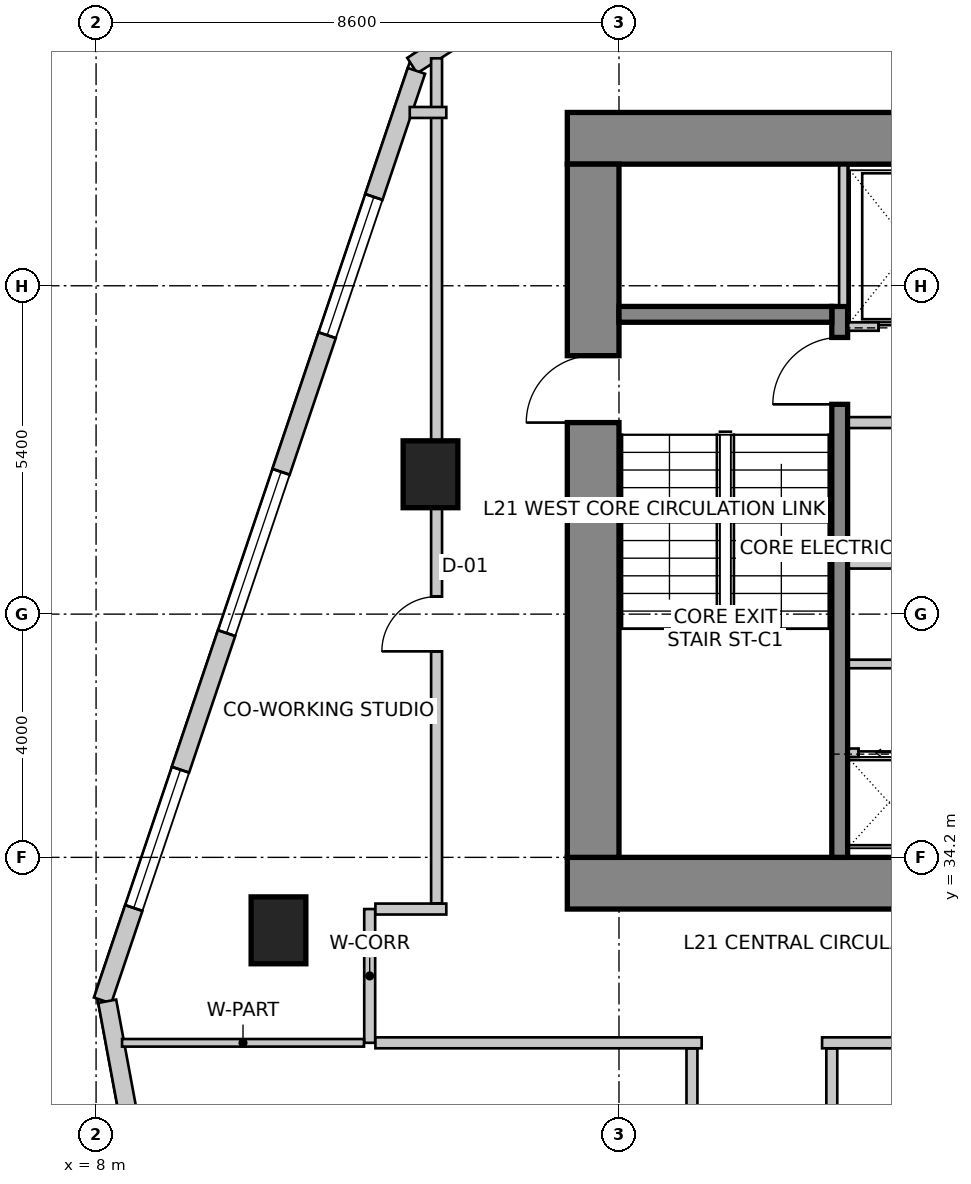
"""IFC4 building model, lengths in metres.
Left out: names, types, materials, properties, quantities, classifications, styles, units other than length and angle.
Written with IfcOpenShell. Run it as: python <this file> out.ifc"""

import sys

from ifc_helpers import new_model, si_unit, direction, frame, frame_2d, origin, origin_2d, place, context, subcontext, project, spatial, rectangle, extrude, source, transform, mapped, element, fill, save


model = new_model("IFC4")
c1 = context("Model", 3, precision=1e-05, world=origin(), true_north=direction((0.0, 1.0)))
c2 = subcontext(c1, "Body", "Model", "MODEL_VIEW")
j1 = project(units=[si_unit("LENGTHUNIT", "METRE"), si_unit("PLANEANGLEUNIT", "RADIAN")], contexts=[c1])
p1 = place(None, origin())
s1 = spatial("IfcSite", under=j1, at=p1, CompositionType="ELEMENT")
p2 = place(p1, origin())
s2 = spatial("IfcBuilding", under=s1, at=p2, CompositionType="ELEMENT")
p3 = place(p2, frame((0.0, 0.0, 87.0)))
s3 = spatial("IfcBuildingStorey", under=s2, at=p3, CompositionType="ELEMENT", Elevation=87.0)
p4 = place(p3, frame((15.75, 46.025, 0.0), z_axis=(0.0, 0.0, 1.0), x_axis=(1.0, 0.0, 0.0)))
e1 = element("IfcWall", 1, at=p4, inside=s3, PredefinedType="SHEAR", context=c2, shape_type="SweptSolid", body=[
    extrude(rectangle(XDim=16.1, YDim=0.85, at=frame_2d((8.05, 0.0))), origin(), (0.0, 0.0, 1.0), 4.0),
])
p5 = place(p3, frame((15.75, 33.775, 0.0), z_axis=(0.0, 0.0, 1.0), x_axis=(1.0, 0.0, 0.0)))
e2 = element("IfcWall", 2, at=p5, inside=s3, PredefinedType="SHEAR", context=c2, shape_type="SweptSolid", body=[
    extrude(rectangle(XDim=16.1, YDim=0.85, at=frame_2d((8.05, 0.0))), origin(), (0.0, 0.0, 1.0), 4.0),
])
m1 = source(origin(), c2, "Body", "SweptSolid", [
    extrude(rectangle(XDim=1.3, YDim=2.15, at=frame_2d((0.65, 1.075))), frame((0.0, 0.435, 0.0), z_axis=(0.0, -1.0, 0.0), x_axis=(1.0, 0.0, 0.0)), (0.0, 0.0, 1.0), 0.87),
])
p6 = place(p5, frame((10.18, 0.0, 0.0)))
e3 = element("IfcOpeningElement", 3, at=p6, cuts=e2, PredefinedType="OPENING", context=c2, shape_type="MappedRepresentation", body=[
    mapped(m1, transform((0.0, 0.0, 0.0), scale=1.0)),
])
p7 = place(p3, frame((16.175, 34.2, 0.0), z_axis=(0.0, 0.0, 1.0), x_axis=(0.0, 1.0, 0.0)))
e4 = element("IfcWall", 4, at=p7, inside=s3, PredefinedType="SHEAR", context=c2, shape_type="SweptSolid", body=[
    extrude(rectangle(XDim=11.4, YDim=0.85, at=frame_2d((5.7, 0.0))), origin(), (0.0, 0.0, 1.0), 4.0),
])
m2 = source(origin(), c2, "Body", "SweptSolid", [
    extrude(rectangle(XDim=1.1, YDim=2.15, at=frame_2d((0.55, 1.075))), frame((0.0, 0.435, 0.0), z_axis=(0.0, -1.0, 0.0), x_axis=(1.0, 0.0, 0.0)), (0.0, 0.0, 1.0), 0.87),
])
p8 = place(p7, frame((7.15, 0.0, 0.0)))
e5 = element("IfcOpeningElement", 5, at=p8, cuts=e4, PredefinedType="OPENING", context=c2, shape_type="MappedRepresentation", body=[
    mapped(m2, transform((0.0, 0.0, 0.0), scale=1.0)),
])
p9 = place(p3, frame((20.23, 34.2, 0.0), z_axis=(0.0, 0.0, 1.0), x_axis=(0.0, 1.0, 0.0)))
e6 = element("IfcWall", 6, at=p9, inside=s3, PredefinedType="SHEAR", context=c2, shape_type="SweptSolid", body=[
    extrude(rectangle(XDim=9.06, YDim=0.26, at=frame_2d((4.53, 0.0))), origin(), (0.0, 0.0, 1.0), 4.0),
])
m3 = source(origin(), c2, "Body", "SweptSolid", [
    extrude(rectangle(XDim=1.1, YDim=2.15, at=frame_2d((0.55, 1.075))), frame((0.0, 0.14, 0.0), z_axis=(0.0, -1.0, 0.0), x_axis=(1.0, 0.0, 0.0)), (0.0, 0.0, 1.0), 0.28),
])
p10 = place(p9, frame((7.45, 0.0, 0.0)))
e7 = element("IfcOpeningElement", 7, at=p10, cuts=e6, PredefinedType="OPENING", context=c2, shape_type="MappedRepresentation", body=[
    mapped(m3, transform((0.0, 0.0, 0.0), scale=1.0)),
])
p11 = place(p3, frame((16.6, 43.13, 0.0), z_axis=(0.0, 0.0, 1.0), x_axis=(1.0, 0.0, 0.0)))
e8 = element("IfcWall", 8, at=p11, inside=s3, PredefinedType="SHEAR", context=c2, shape_type="SweptSolid", body=[
    extrude(rectangle(XDim=3.5, YDim=0.26, at=frame_2d((1.75, 0.0))), origin(), (0.0, 0.0, 1.0), 4.0),
])
m4 = source(origin(), c2, "Body", "SweptSolid", [
    extrude(rectangle(XDim=0.9, YDim=1.1, at=origin_2d()), origin(), (0.0, 0.0, 1.0), 4.0),
])
for number, where, z_axis, x_axis in (
    (9, (11.0, 33.0, 0.0), (0.0, 0.0, 1.0), (1.0, 0.0, 0.0)),
    (10, (13.5, 40.5, 0.0), (0.0, 0.0, 1.0), (1.0, 0.0, 0.0)),
):
    element("IfcColumn", number, at=place(p3, frame(where, z_axis=z_axis, x_axis=x_axis)), inside=s3, PredefinedType="COLUMN", context=c2, shape_type="MappedRepresentation", body=[
        mapped(m4, transform((0.0, 0.0, 0.0), scale=1.0)),
    ])
p12 = place(p3, frame((21.875, 52.742, 0.0), z_axis=(0.0, 0.0, 1.0), x_axis=(-0.843662465249, -0.536873956092, 0.0)))
e11 = element("IfcWall", 11, at=p12, inside=s3, PredefinedType="SOLIDWALL", context=c2, shape_type="SweptSolid", body=[
    extrude(rectangle(XDim=10.284, YDim=0.3, at=frame_2d((5.142, 0.0))), origin(), (0.0, 0.0, 1.0), 3.75),
])
m5 = source(origin(), c2, "Body", "SweptSolid", [
    extrude(rectangle(XDim=1.2, YDim=1.6, at=frame_2d((0.6, 0.8))), frame((0.0, 0.16, 0.0), z_axis=(0.0, -1.0, 0.0), x_axis=(1.0, 0.0, 0.0)), (0.0, 0.0, 1.0), 0.32),
])
p13 = place(p12, frame((0.479, 0.0, 0.85)))
e12 = element("IfcOpeningElement", 12, at=p13, cuts=e11, PredefinedType="OPENING", context=c2, shape_type="MappedRepresentation", body=[
    mapped(m5, transform((0.0, 0.0, 0.0), scale=1.0)),
])
m6 = source(origin(), c2, "Body", "SweptSolid", [
    extrude(rectangle(XDim=2.8, YDim=2.4, at=frame_2d((1.4, 1.2))), frame((0.0, 0.16, 0.0), z_axis=(0.0, -1.0, 0.0), x_axis=(1.0, 0.0, 0.0)), (0.0, 0.0, 1.0), 0.32),
])
p14 = place(p12, frame((3.342, 0.0, 0.85)))
e13 = element("IfcOpeningElement", 13, at=p14, cuts=e11, PredefinedType="OPENING", context=c2, shape_type="MappedRepresentation", body=[
    mapped(m6, transform((0.0, 0.0, 0.0), scale=1.0)),
])
m7 = source(origin(), c2, "Body", "SweptSolid", [
    extrude(rectangle(XDim=1.8, YDim=2.1, at=frame_2d((0.9, 1.05))), frame((0.0, 0.16, 0.0), z_axis=(0.0, -1.0, 0.0), x_axis=(1.0, 0.0, 0.0)), (0.0, 0.0, 1.0), 0.32),
])
p15 = place(p12, frame((7.753, 0.0, 0.85)))
e14 = element("IfcOpeningElement", 14, at=p15, cuts=e11, PredefinedType="OPENING", context=c2, shape_type="MappedRepresentation", body=[
    mapped(m7, transform((0.0, 0.0, 0.0), scale=1.0)),
])
p16 = place(p3, frame((13.269, 47.134, 0.0), z_axis=(0.0, 0.0, 1.0), x_axis=(-0.319920423265, -0.947444416722, 0.0)))
e15 = element("IfcWall", 15, at=p16, inside=s3, PredefinedType="SOLIDWALL", context=c2, shape_type="SweptSolid", body=[
    extrude(rectangle(XDim=16.135, YDim=0.3, at=frame_2d((8.067, 0.0))), origin(), (0.0, 0.0, 1.0), 3.75),
])
m8 = source(origin(), c2, "Body", "SweptSolid", [
    extrude(rectangle(XDim=2.4, YDim=2.2, at=frame_2d((1.2, 1.1))), frame((0.0, 0.16, 0.0), z_axis=(0.0, -1.0, 0.0), x_axis=(1.0, 0.0, 0.0)), (0.0, 0.0, 1.0), 0.32),
])
p17 = place(p16, frame((2.188, 0.0, 0.85)))
e16 = element("IfcOpeningElement", 16, at=p17, cuts=e15, PredefinedType="OPENING", context=c2, shape_type="MappedRepresentation", body=[
    mapped(m8, transform((0.0, 0.0, 0.0), scale=1.0)),
])
p18 = place(p16, frame((6.959, 0.0, 0.85)))
e17 = element("IfcOpeningElement", 17, at=p18, cuts=e15, PredefinedType="OPENING", context=c2, shape_type="MappedRepresentation", body=[
    mapped(m6, transform((0.0, 0.0, 0.0), scale=1.0)),
])
p19 = place(p16, frame((12.13, 0.0, 0.85)))
e18 = element("IfcOpeningElement", 18, at=p19, cuts=e15, PredefinedType="OPENING", context=c2, shape_type="MappedRepresentation", body=[
    mapped(m8, transform((0.0, 0.0, 0.0), scale=1.0)),
])
p20 = place(p3, frame((8.183, 31.833, 0.0), z_axis=(0.0, 0.0, 1.0), x_axis=(0.18216364648, -0.983268226834, 0.0)))
e19 = element("IfcWall", 19, at=p20, inside=s3, PredefinedType="SOLIDWALL", context=c2, shape_type="SweptSolid", body=[
    extrude(rectangle(XDim=26.678, YDim=0.3, at=frame_2d((13.339, 0.0))), origin(), (0.0, 0.0, 1.0), 3.75),
])
p21 = place(p20, frame((2.952, 0.0, 0.85)))
e20 = element("IfcOpeningElement", 20, at=p21, cuts=e19, PredefinedType="OPENING", context=c2, shape_type="MappedRepresentation", body=[
    mapped(m6, transform((0.0, 0.0, 0.0), scale=1.0)),
])
p22 = place(p20, frame((8.876, 0.0, 0.85)))
e21 = element("IfcOpeningElement", 21, at=p22, cuts=e19, PredefinedType="OPENING", context=c2, shape_type="MappedRepresentation", body=[
    mapped(m6, transform((0.0, 0.0, 0.0), scale=1.0)),
])
p23 = place(p20, frame((13.647, 0.0, 0.85)))
e22 = element("IfcOpeningElement", 22, at=p23, cuts=e19, PredefinedType="OPENING", context=c2, shape_type="MappedRepresentation", body=[
    mapped(m6, transform((0.0, 0.0, 0.0), scale=1.0)),
])
p24 = place(p20, frame((18.372, 0.0, 0.85)))
e23 = element("IfcOpeningElement", 23, at=p24, cuts=e19, PredefinedType="OPENING", context=c2, shape_type="MappedRepresentation", body=[
    mapped(m8, transform((0.0, 0.0, 0.0), scale=1.0)),
])
p25 = place(p20, frame((22.696, 0.0, 0.85)))
e24 = element("IfcOpeningElement", 24, at=p25, cuts=e19, PredefinedType="OPENING", context=c2, shape_type="MappedRepresentation", body=[
    mapped(m6, transform((0.0, 0.0, 0.0), scale=1.0)),
])
p26 = place(p3, frame((20.37, 42.93, 0.0), z_axis=(0.0, 0.0, 1.0), x_axis=(1.0, 0.0, 0.0)))
e25 = element("IfcWall", 25, at=p26, inside=s3, PredefinedType="SOLIDWALL", context=c2, shape_type="SweptSolid", body=[
    extrude(rectangle(XDim=6.86, YDim=0.14, at=frame_2d((3.43, 0.0))), origin(), (0.0, 0.0, 1.0), 3.75),
])
m9 = source(origin(), c2, "Body", "SweptSolid", [
    extrude(rectangle(XDim=1.1, YDim=2.15, at=frame_2d((0.55, 1.075))), frame((0.0, 0.08, 0.0), z_axis=(0.0, -1.0, 0.0), x_axis=(1.0, 0.0, 0.0)), (0.0, 0.0, 1.0), 0.16),
])
p27 = place(p26, frame((0.5, 0.0, 0.0)))
e26 = element("IfcOpeningElement", 26, at=p27, cuts=e25, PredefinedType="OPENING", context=c2, shape_type="MappedRepresentation", body=[
    mapped(m9, transform((0.0, 0.0, 0.0), scale=1.0)),
])
p28 = place(p26, frame((2.7, 0.0, 0.0)))
e27 = element("IfcOpeningElement", 27, at=p28, cuts=e25, PredefinedType="OPENING", context=c2, shape_type="MappedRepresentation", body=[
    mapped(m9, transform((0.0, 0.0, 0.0), scale=1.0)),
])
p29 = place(p26, frame((5.1, 0.0, 0.0)))
e28 = element("IfcOpeningElement", 28, at=p29, cuts=e25, PredefinedType="OPENING", context=c2, shape_type="MappedRepresentation", body=[
    mapped(m9, transform((0.0, 0.0, 0.0), scale=1.0)),
])
p30 = place(p3, frame((20.29, 43.28, 0.0), z_axis=(0.0, 0.0, 1.0), x_axis=(0.0, 1.0, 0.0)))
e29 = element("IfcWall", 29, at=p30, inside=s3, PredefinedType="SOLIDWALL", context=c2, shape_type="SweptSolid", body=[
    extrude(rectangle(XDim=2.3, YDim=0.14, at=frame_2d((1.15, 0.0))), origin(), (0.0, 0.0, 1.0), 3.75),
])
p31 = place(p3, frame((20.38, 35.92, 0.0), z_axis=(0.0, 0.0, 1.0), x_axis=(1.0, 0.0, 0.0)))
e30 = element("IfcWall", 30, at=p31, inside=s3, PredefinedType="SOLIDWALL", context=c2, shape_type="SweptSolid", body=[
    extrude(rectangle(XDim=5.65, YDim=0.14, at=frame_2d((2.825, 0.0))), origin(), (0.0, 0.0, 1.0), 3.75),
])
m10 = source(origin(), c2, "Body", "SweptSolid", [
    extrude(rectangle(XDim=1.0, YDim=2.15, at=frame_2d((0.5, 1.075))), frame((0.0, 0.08, 0.0), z_axis=(0.0, -1.0, 0.0), x_axis=(1.0, 0.0, 0.0)), (0.0, 0.0, 1.0), 0.16),
])
p32 = place(p31, frame((0.16, 0.0, 0.0)))
e31 = element("IfcOpeningElement", 31, at=p32, cuts=e30, PredefinedType="OPENING", context=c2, shape_type="MappedRepresentation", body=[
    mapped(m10, transform((0.0, 0.0, 0.0), scale=1.0)),
])
p33 = place(p31, frame((1.55, 0.0, 0.0)))
e32 = element("IfcOpeningElement", 32, at=p33, cuts=e30, PredefinedType="OPENING", context=c2, shape_type="MappedRepresentation", body=[
    mapped(m10, transform((0.0, 0.0, 0.0), scale=1.0)),
])
p34 = place(p3, frame((20.38, 37.38, 0.0), z_axis=(0.0, 0.0, 1.0), x_axis=(1.0, 0.0, 0.0)))
e33 = element("IfcWall", 33, at=p34, inside=s3, PredefinedType="SOLIDWALL", context=c2, shape_type="SweptSolid", body=[
    extrude(rectangle(XDim=5.75, YDim=0.14, at=frame_2d((2.875, 0.0))), origin(), (0.0, 0.0, 1.0), 3.75),
])
p35 = place(p3, frame((20.38, 39.04, 0.0), z_axis=(0.0, 0.0, 1.0), x_axis=(1.0, 0.0, 0.0)))
e34 = element("IfcWall", 34, at=p35, inside=s3, PredefinedType="SOLIDWALL", context=c2, shape_type="SweptSolid", body=[
    extrude(rectangle(XDim=5.75, YDim=0.18, at=frame_2d((2.875, 0.0))), origin(), (0.0, 0.0, 1.0), 3.75),
])
p36 = place(p3, frame((22.96, 41.35, 0.0), z_axis=(0.0, 0.0, 1.0), x_axis=(-1.0, 0.0, 0.0)))
e35 = element("IfcWall", 35, at=p36, inside=s3, PredefinedType="PARTITIONING", context=c2, shape_type="SweptSolid", body=[
    extrude(rectangle(XDim=2.58, YDim=0.18, at=frame_2d((1.29, 0.0))), origin(), (0.0, 0.0, 1.0), 3.75),
])
p37 = place(p3, frame((12.5, 31.15, 0.0), z_axis=(0.0, 0.0, 1.0), x_axis=(0.0, 1.0, 0.0)))
e36 = element("IfcWall", 36, at=p37, inside=s3, PredefinedType="PARTITIONING", context=c2, shape_type="SweptSolid", body=[
    extrude(rectangle(XDim=2.2, YDim=0.18, at=frame_2d((1.1, 0.0))), origin(), (0.0, 0.0, 1.0), 3.335),
])
p38 = place(p3, frame((12.594, 33.35, 0.0), z_axis=(0.0, 0.0, 1.0), x_axis=(1.0, 0.0, 0.0)))
e37 = element("IfcWall", 37, at=p38, inside=s3, PredefinedType="PARTITIONING", context=c2, shape_type="SweptSolid", body=[
    extrude(rectangle(XDim=1.166, YDim=0.18, at=frame_2d((0.583, 0.0))), origin(), (0.0, 0.0, 1.0), 3.75),
])
p39 = place(p3, frame((17.96, 31.15, 0.0), z_axis=(0.0, 0.0, 1.0), x_axis=(-1.0, 0.0, 0.0)))
e38 = element("IfcWall", 38, at=p39, inside=s3, PredefinedType="PARTITIONING", context=c2, shape_type="SweptSolid", body=[
    extrude(rectangle(XDim=5.366, YDim=0.18, at=frame_2d((2.683, 0.0))), origin(), (0.0, 0.0, 1.0), 3.335),
])
p40 = place(p3, frame((26.76, 31.15, 0.0), z_axis=(0.0, 0.0, 1.0), x_axis=(-1.0, 0.0, 0.0)))
e39 = element("IfcWall", 39, at=p40, inside=s3, PredefinedType="PARTITIONING", context=c2, shape_type="SweptSolid", body=[
    extrude(rectangle(XDim=6.82, YDim=0.18, at=frame_2d((3.41, 0.0))), origin(), (0.0, 0.0, 1.0), 3.335),
])
p41 = place(p3, frame((13.6, 33.444, 0.0), z_axis=(0.0, 0.0, 1.0), x_axis=(0.0, 1.0, 0.0)))
e40 = element("IfcWall", 40, at=p41, inside=s3, PredefinedType="PARTITIONING", context=c2, shape_type="SweptSolid", body=[
    extrude(rectangle(XDim=13.896, YDim=0.18, at=frame_2d((6.948, 0.0))), origin(), (0.0, 0.0, 1.0), 2.892),
])
m11 = source(origin(), c2, "Body", "SweptSolid", [
    extrude(rectangle(XDim=0.9, YDim=2.15, at=frame_2d((0.45, 1.075))), frame((0.0, 0.1, 0.0), z_axis=(0.0, -1.0, 0.0), x_axis=(1.0, 0.0, 0.0)), (0.0, 0.0, 1.0), 0.2),
])
p42 = place(p41, frame((4.144, 0.0, 0.0)))
e41 = element("IfcOpeningElement", 41, at=p42, cuts=e40, PredefinedType="OPENING", context=c2, shape_type="MappedRepresentation", body=[
    mapped(m11, transform((0.0, 0.0, 0.0), scale=1.0)),
])
p43 = place(p3, frame((13.76, 46.45, 0.0), z_axis=(0.0, 0.0, 1.0), x_axis=(-1.0, 0.0, 0.0)))
e42 = element("IfcWall", 42, at=p43, inside=s3, PredefinedType="PARTITIONING", context=c2, shape_type="SweptSolid", body=[
    extrude(rectangle(XDim=0.601, YDim=0.18, at=frame_2d((0.301, 0.0))), origin(), (0.0, 0.0, 1.0), 3.75),
])
p44 = place(p3, frame((12.406, 31.15, 0.0), z_axis=(0.0, 0.0, 1.0), x_axis=(-1.0, 0.0, 0.0)))
e43 = element("IfcWall", 43, at=p44, inside=s3, PredefinedType="PARTITIONING", context=c2, shape_type="SweptSolid", body=[
    extrude(rectangle(XDim=3.979, YDim=0.125, at=frame_2d((1.99, 0.0))), origin(), (0.0, 0.0, 1.0), 2.892),
])
p45 = place(p3, frame((17.8, 23.84, 0.0), z_axis=(0.0, 0.0, 1.0), x_axis=(0.0, 1.0, 0.0)))
e44 = element("IfcWall", 44, at=p45, inside=s3, PredefinedType="PARTITIONING", context=c2, shape_type="SweptSolid", body=[
    extrude(rectangle(XDim=7.216, YDim=0.18, at=frame_2d((3.608, 0.0))), origin(), (0.0, 0.0, 1.0), 3.125),
])
p46 = place(p45, frame((3.097, 0.0, 0.0)))
e45 = element("IfcOpeningElement", 45, at=p46, cuts=e44, PredefinedType="OPENING", context=c2, shape_type="MappedRepresentation", body=[
    mapped(m11, transform((0.0, 0.0, 0.0), scale=1.0)),
])
p47 = place(p3, frame((20.1, 31.056, 0.0), z_axis=(0.0, 0.0, 1.0), x_axis=(0.0, -1.0, 0.0)))
e46 = element("IfcWall", 46, at=p47, inside=s3, PredefinedType="PARTITIONING", context=c2, shape_type="SweptSolid", body=[
    extrude(rectangle(XDim=7.216, YDim=0.18, at=frame_2d((3.608, 0.0))), origin(), (0.0, 0.0, 1.0), 3.125),
])
p48 = place(p47, frame((3.097, 0.0, 0.0)))
e47 = element("IfcOpeningElement", 47, at=p48, cuts=e46, PredefinedType="OPENING", context=c2, shape_type="MappedRepresentation", body=[
    mapped(m11, transform((0.0, 0.0, 0.0), scale=1.0)),
])
m12 = source(origin(), c2, "Body", "SweptSolid", [
    extrude(rectangle(XDim=2.4, YDim=2.2, at=frame_2d((1.2, 1.1))), frame((0.0, -0.015, 0.0), z_axis=(0.0, -1.0, 0.0), x_axis=(1.0, 0.0, 0.0)), (0.0, 0.0, 1.0), 0.06),
])
p49 = place(p17, origin())
e48 = element("IfcWindow", 48, at=p49, inside=s3, PartitioningType="SINGLE_PANEL", PredefinedType="WINDOW", context=c2, shape_type="MappedRepresentation", body=[
    mapped(m12, transform((0.0, 0.0, 0.0), scale=1.0)),
])
fill(e16, e48)
m13 = source(origin(), c2, "Body", "SweptSolid", [
    extrude(rectangle(XDim=2.8, YDim=2.4, at=frame_2d((1.4, 1.2))), frame((0.0, -0.015, 0.0), z_axis=(0.0, -1.0, 0.0), x_axis=(1.0, 0.0, 0.0)), (0.0, 0.0, 1.0), 0.06),
])
p50 = place(p18, origin())
e49 = element("IfcWindow", 49, at=p50, inside=s3, PartitioningType="SINGLE_PANEL", PredefinedType="WINDOW", context=c2, shape_type="MappedRepresentation", body=[
    mapped(m13, transform((0.0, 0.0, 0.0), scale=1.0)),
])
fill(e17, e49)
p51 = place(p19, origin())
e50 = element("IfcWindow", 50, at=p51, inside=s3, PartitioningType="SINGLE_PANEL", PredefinedType="WINDOW", context=c2, shape_type="MappedRepresentation", body=[
    mapped(m12, transform((0.0, 0.0, 0.0), scale=1.0)),
])
fill(e18, e50)
m14 = source(origin(), c2, "Body", "SweptSolid", [
    extrude(rectangle(XDim=1.1, YDim=2.15, at=frame_2d((0.55, 1.075))), frame((0.0, 0.025, 0.0), z_axis=(0.0, -1.0, 0.0), x_axis=(1.0, 0.0, 0.0)), (0.0, 0.0, 1.0), 0.05),
])
p52 = place(p27, origin())
e51 = element("IfcDoor", 51, at=p52, inside=s3, OperationType="SLIDING_TO_LEFT", PredefinedType="DOOR", context=c2, shape_type="MappedRepresentation", body=[
    mapped(m14, transform((0.0, 0.0, 0.0), scale=1.0)),
])
fill(e26, e51)
m15 = source(origin(), c2, "Body", "SweptSolid", [
    extrude(rectangle(XDim=1.0, YDim=2.15, at=frame_2d((0.5, 1.075))), frame((0.0, 0.025, 0.0), z_axis=(0.0, -1.0, 0.0), x_axis=(1.0, 0.0, 0.0)), (0.0, 0.0, 1.0), 0.05),
])
p53 = place(p32, origin())
e52 = element("IfcDoor", 52, at=p53, inside=s3, OperationType="SLIDING_TO_LEFT", PredefinedType="DOOR", context=c2, shape_type="MappedRepresentation", body=[
    mapped(m15, transform((0.0, 0.0, 0.0), scale=1.0)),
])
fill(e31, e52)
m16 = source(origin(), c2, "Body", "SweptSolid", [
    extrude(rectangle(XDim=1.1, YDim=2.15, at=frame_2d((0.55, 1.075))), frame((0.0, 0.025, 0.0), z_axis=(0.0, -1.0, 0.0), x_axis=(1.0, 0.0, 0.0)), (0.0, 0.0, 1.0), 0.05),
])
p54 = place(p10, origin())
e53 = element("IfcDoor", 53, at=p54, inside=s3, OperationType="SINGLE_SWING_LEFT", PredefinedType="DOOR", context=c2, shape_type="MappedRepresentation", body=[
    mapped(m16, transform((0.0, 0.0, 0.0), scale=1.0)),
])
fill(e7, e53)
p55 = place(p8, origin())
e54 = element("IfcDoor", 54, at=p55, inside=s3, OperationType="SINGLE_SWING_LEFT", PredefinedType="DOOR", context=c2, shape_type="MappedRepresentation", body=[
    mapped(m16, transform((0.0, 0.0, 0.0), scale=1.0)),
])
fill(e5, e54)
m17 = source(origin(), c2, "Body", "SweptSolid", [
    extrude(rectangle(XDim=0.9, YDim=2.15, at=frame_2d((0.45, 1.075))), frame((0.0, 0.025, 0.0), z_axis=(0.0, -1.0, 0.0), x_axis=(1.0, 0.0, 0.0)), (0.0, 0.0, 1.0), 0.05),
])
p56 = place(p42, origin())
e55 = element("IfcDoor", 55, at=p56, inside=s3, OperationType="SINGLE_SWING_LEFT", PredefinedType="DOOR", context=c2, shape_type="MappedRepresentation", body=[
    mapped(m17, transform((0.0, 0.0, 0.0), scale=1.0)),
])
fill(e41, e55)
save(model, sys.argv[1])
